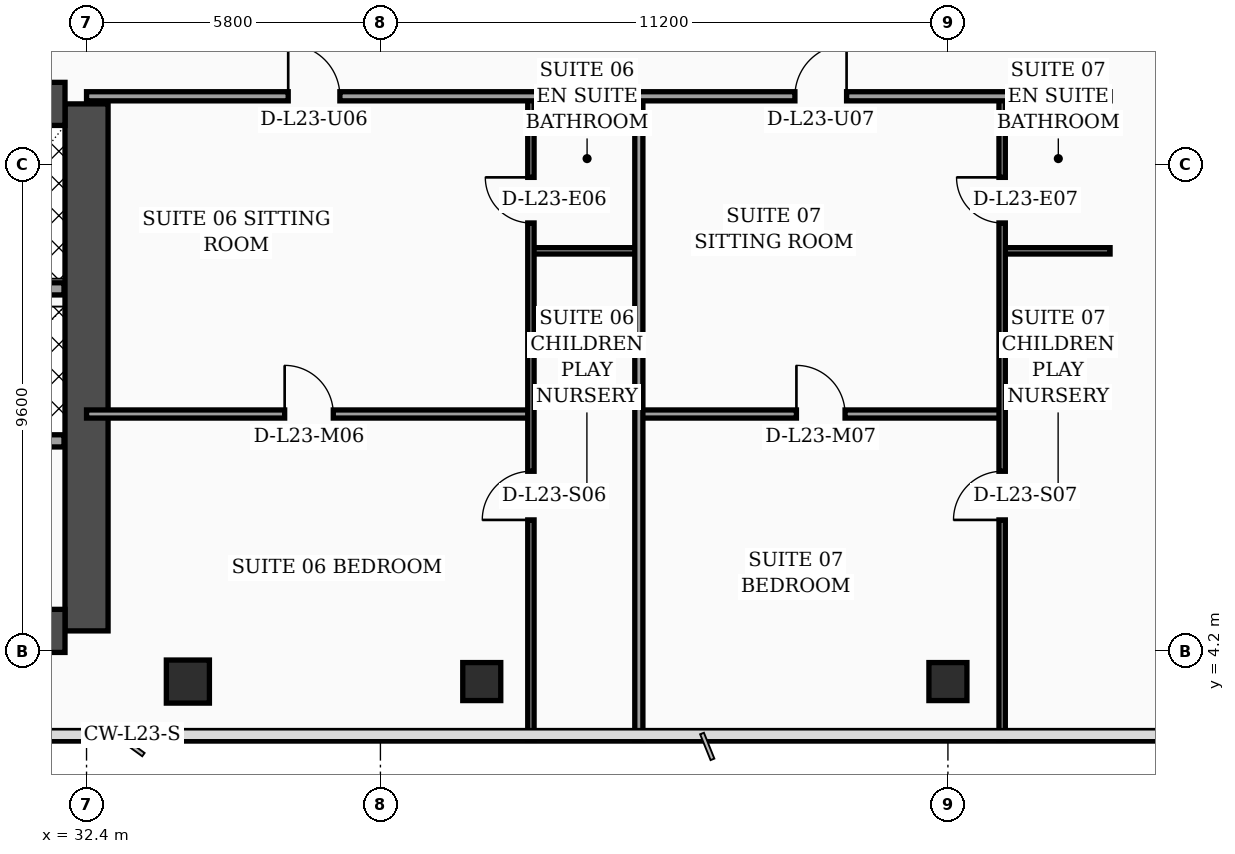
"""IFC4 building model, lengths in metres.
Left out: names, types, materials, properties, quantities, classifications, styles, units other than length and angle.
Written with IfcOpenShell. Run it as: python <this file> out.ifc"""

import sys

from ifc_helpers import new_model, si_unit, direction, frame, frame_2d, origin, origin_2d, place, context, subcontext, project, spatial, rectangle, hollow_rectangle, extrude, element, fill, save


model = new_model("IFC4")
c1 = context("Model", 3, precision=1e-05, world=origin(), true_north=direction((0.0, 1.0)))
c2 = subcontext(c1, "Body", "Model", "MODEL_VIEW")
j1 = project(units=[si_unit("LENGTHUNIT", "METRE"), si_unit("PLANEANGLEUNIT", "RADIAN")], contexts=[c1])
p1 = place(None, origin())
s1 = spatial("IfcSite", under=j1, at=p1, CompositionType="ELEMENT")
p2 = place(p1, origin())
s2 = spatial("IfcBuilding", under=s1, at=p2, CompositionType="ELEMENT")
p3 = place(p2, frame((0.0, 0.0, 97.4)))
s3 = spatial("IfcBuildingStorey", under=s2, at=p3, CompositionType="ELEMENT", Elevation=97.4)
p4 = place(p3, frame((32.4, 4.6, 0.0), z_axis=(0.0, 0.0, 1.0), x_axis=(0.0, 1.0, 0.0)))
e1 = element("IfcWall", 1, at=p4, inside=s3, PredefinedType="SHEAR", context=c2, shape_type="SweptSolid", body=[
    extrude(rectangle(XDim=10.4, YDim=0.85, at=frame_2d((5.2, 0.0))), origin(), (0.0, 0.0, 1.0), 3.56),
])
p5 = place(p3, frame((22.025, 15.0, 0.0), z_axis=(0.0, 0.0, 1.0), x_axis=(1.0, 0.0, 0.0)))
e2 = element("IfcWall", 2, at=p5, inside=s3, PredefinedType="SHEAR", context=c2, shape_type="SweptSolid", body=[
    extrude(rectangle(XDim=9.95, YDim=0.85, at=frame_2d((4.975, 0.0))), origin(), (0.0, 0.0, 1.0), 3.56),
])
p6 = place(p5, frame((4.88, 0.0, 0.0)))
e3 = element("IfcOpeningElement", 3, at=p6, cuts=e2, PredefinedType="OPENING", context=c2, shape_type="SweptSolid", body=[
    extrude(rectangle(XDim=1.1, YDim=2.2, at=frame_2d((0.55, 1.1))), frame((0.0, 0.435, 0.0), z_axis=(0.0, -1.0, 0.0), x_axis=(1.0, 0.0, 0.0)), (0.0, 0.0, 1.0), 0.87),
])
p7 = place(p3, frame((22.025, 4.6, 0.0), z_axis=(0.0, 0.0, 1.0), x_axis=(1.0, 0.0, 0.0)))
e4 = element("IfcWall", 4, at=p7, inside=s3, PredefinedType="SHEAR", context=c2, shape_type="SweptSolid", body=[
    extrude(rectangle(XDim=9.95, YDim=0.85, at=frame_2d((4.975, 0.0))), origin(), (0.0, 0.0, 1.0), 3.56),
])
p8 = place(p3, frame((34.4, 3.6, 0.0), z_axis=(0.0, 0.0, 1.0), x_axis=(1.0, 0.0, 0.0)))
e5 = element("IfcColumn", 5, at=p8, inside=s3, PredefinedType="COLUMN", context=c2, shape_type="SweptSolid", body=[
    extrude(hollow_rectangle(XDim=0.85, YDim=0.85, WallThickness=0.036, at=origin_2d()), origin(), (0.0, 0.0, 1.0), 3.56),
])
for number, where, z_axis, x_axis in (
    (6, (40.2, 3.6, 0.0), (0.0, 0.0, 1.0), (1.0, 0.0, 0.0)),
    (7, (49.4, 3.6, 0.0), (0.0, 0.0, 1.0), (1.0, 0.0, 0.0)),
):
    element("IfcColumn", number, at=place(p3, frame(where, z_axis=z_axis, x_axis=x_axis)), inside=s3, PredefinedType="COLUMN", context=c2, shape_type="SweptSolid", body=[
        extrude(hollow_rectangle(XDim=0.75, YDim=0.75, WallThickness=0.032, at=origin_2d()), origin(), (0.0, 0.0, 1.0), 3.56),
    ])
p9 = place(p3, frame((59.23, 5.505, 0.0), z_axis=(0.0, 0.0, 1.0), x_axis=(-0.300509063924, 0.953778958931, 0.0)))
e8 = element("IfcWall", 8, at=p9, inside=s3, PredefinedType="SOLIDWALL", context=c2, shape_type="SweptSolid", body=[
    extrude(rectangle(XDim=30.814, YDim=0.32, at=frame_2d((15.407, 0.0))), origin(), (0.0, 0.0, 1.0), 3.56),
])
p10 = place(p9, frame((8.9, 0.0, 0.0)))
e9 = element("IfcOpeningElement", 9, at=p10, cuts=e8, PredefinedType="OPENING", context=c2, shape_type="SweptSolid", body=[
    extrude(rectangle(XDim=1.4, YDim=2.25, at=frame_2d((0.7, 1.125))), frame((0.0, 0.17, 0.0), z_axis=(0.0, -1.0, 0.0), x_axis=(1.0, 0.0, 0.0)), (0.0, 0.0, 1.0), 0.34),
])
p11 = place(p9, frame((1.6, 0.0, 0.75)))
e10 = element("IfcOpeningElement", 10, at=p11, cuts=e8, PredefinedType="OPENING", context=c2, shape_type="SweptSolid", body=[
    extrude(rectangle(XDim=1.5, YDim=1.6, at=frame_2d((0.75, 0.8))), frame((0.0, 0.17, 0.0), z_axis=(0.0, -1.0, 0.0), x_axis=(1.0, 0.0, 0.0)), (0.0, 0.0, 1.0), 0.34),
])
p12 = place(p9, frame((4.7, 0.0, 0.75)))
e11 = element("IfcOpeningElement", 11, at=p12, cuts=e8, PredefinedType="OPENING", context=c2, shape_type="SweptSolid", body=[
    extrude(rectangle(XDim=1.5, YDim=1.6, at=frame_2d((0.75, 0.8))), frame((0.0, 0.17, 0.0), z_axis=(0.0, -1.0, 0.0), x_axis=(1.0, 0.0, 0.0)), (0.0, 0.0, 1.0), 0.34),
])
p13 = place(p9, frame((6.75, 0.0, 0.75)))
e12 = element("IfcOpeningElement", 12, at=p13, cuts=e8, PredefinedType="OPENING", context=c2, shape_type="SweptSolid", body=[
    extrude(rectangle(XDim=1.5, YDim=1.6, at=frame_2d((0.75, 0.8))), frame((0.0, 0.17, 0.0), z_axis=(0.0, -1.0, 0.0), x_axis=(1.0, 0.0, 0.0)), (0.0, 0.0, 1.0), 0.34),
])
p14 = place(p9, frame((10.9, 0.0, 0.75)))
e13 = element("IfcOpeningElement", 13, at=p14, cuts=e8, PredefinedType="OPENING", context=c2, shape_type="SweptSolid", body=[
    extrude(rectangle(XDim=1.5, YDim=1.6, at=frame_2d((0.75, 0.8))), frame((0.0, 0.17, 0.0), z_axis=(0.0, -1.0, 0.0), x_axis=(1.0, 0.0, 0.0)), (0.0, 0.0, 1.0), 0.34),
])
p15 = place(p9, frame((14.0, 0.0, 0.75)))
e14 = element("IfcOpeningElement", 14, at=p15, cuts=e8, PredefinedType="OPENING", context=c2, shape_type="SweptSolid", body=[
    extrude(rectangle(XDim=1.5, YDim=1.6, at=frame_2d((0.75, 0.8))), frame((0.0, 0.17, 0.0), z_axis=(0.0, -1.0, 0.0), x_axis=(1.0, 0.0, 0.0)), (0.0, 0.0, 1.0), 0.34),
])
p16 = place(p9, frame((17.1, 0.0, 0.75)))
e15 = element("IfcOpeningElement", 15, at=p16, cuts=e8, PredefinedType="OPENING", context=c2, shape_type="SweptSolid", body=[
    extrude(rectangle(XDim=1.5, YDim=1.6, at=frame_2d((0.75, 0.8))), frame((0.0, 0.17, 0.0), z_axis=(0.0, -1.0, 0.0), x_axis=(1.0, 0.0, 0.0)), (0.0, 0.0, 1.0), 0.34),
])
p17 = place(p9, frame((20.2, 0.0, 0.75)))
e16 = element("IfcOpeningElement", 16, at=p17, cuts=e8, PredefinedType="OPENING", context=c2, shape_type="SweptSolid", body=[
    extrude(rectangle(XDim=1.5, YDim=1.6, at=frame_2d((0.75, 0.8))), frame((0.0, 0.17, 0.0), z_axis=(0.0, -1.0, 0.0), x_axis=(1.0, 0.0, 0.0)), (0.0, 0.0, 1.0), 0.34),
])
p18 = place(p9, frame((23.3, 0.0, 0.75)))
e17 = element("IfcOpeningElement", 17, at=p18, cuts=e8, PredefinedType="OPENING", context=c2, shape_type="SweptSolid", body=[
    extrude(rectangle(XDim=1.5, YDim=1.6, at=frame_2d((0.75, 0.8))), frame((0.0, 0.17, 0.0), z_axis=(0.0, -1.0, 0.0), x_axis=(1.0, 0.0, 0.0)), (0.0, 0.0, 1.0), 0.34),
])
p19 = place(p9, frame((26.4, 0.0, 0.75)))
e18 = element("IfcOpeningElement", 18, at=p19, cuts=e8, PredefinedType="OPENING", context=c2, shape_type="SweptSolid", body=[
    extrude(rectangle(XDim=1.5, YDim=1.6, at=frame_2d((0.75, 0.8))), frame((0.0, 0.17, 0.0), z_axis=(0.0, -1.0, 0.0), x_axis=(1.0, 0.0, 0.0)), (0.0, 0.0, 1.0), 0.34),
])
p20 = place(p3, frame((27.02, 11.35, 0.0), z_axis=(0.0, 0.0, 1.0), x_axis=(1.0, 0.0, 0.0)))
e19 = element("IfcWall", 19, at=p20, inside=s3, PredefinedType="SOLIDWALL", context=c2, shape_type="SweptSolid", body=[
    extrude(rectangle(XDim=4.935, YDim=0.24, at=frame_2d((2.468, 0.0))), origin(), (0.0, 0.0, 1.0), 3.56),
])
p21 = place(p20, frame((0.45, 0.0, 0.0)))
e20 = element("IfcOpeningElement", 20, at=p21, cuts=e19, PredefinedType="OPENING", context=c2, shape_type="SweptSolid", body=[
    extrude(rectangle(XDim=1.3, YDim=2.35, at=frame_2d((0.65, 1.175))), frame((0.0, 0.13, 0.0), z_axis=(0.0, -1.0, 0.0), x_axis=(1.0, 0.0, 0.0)), (0.0, 0.0, 1.0), 0.26),
])
p22 = place(p3, frame((27.02, 8.35, 0.0), z_axis=(0.0, 0.0, 1.0), x_axis=(1.0, 0.0, 0.0)))
e21 = element("IfcWall", 21, at=p22, inside=s3, PredefinedType="SOLIDWALL", context=c2, shape_type="SweptSolid", body=[
    extrude(rectangle(XDim=4.935, YDim=0.24, at=frame_2d((2.468, 0.0))), origin(), (0.0, 0.0, 1.0), 3.09),
])
p23 = place(p3, frame((41.17, 12.1, 0.0), z_axis=(0.0, 0.0, 1.0), x_axis=(1.0, 0.0, 0.0)))
e22 = element("IfcWall", 22, at=p23, inside=s3, PredefinedType="PARTITIONING", context=c2, shape_type="SweptSolid", body=[
    extrude(rectangle(XDim=2.13, YDim=0.125, at=frame_2d((1.065, 0.0))), origin(), (0.0, 0.0, 1.0), 3.56),
])
p24 = place(p3, frame((32.4, 8.88, 0.0), z_axis=(0.0, 0.0, 1.0), x_axis=(1.0, 0.0, 0.0)))
e23 = element("IfcWall", 23, at=p24, inside=s3, PredefinedType="PARTITIONING", context=c2, shape_type="SweptSolid", body=[
    extrude(rectangle(XDim=8.77, YDim=0.16, at=frame_2d((4.385, 0.0))), origin(), (0.0, 0.0, 1.0), 2.84),
])
p25 = place(p24, frame((3.91, 0.0, 0.0)))
e24 = element("IfcOpeningElement", 24, at=p25, cuts=e23, PredefinedType="OPENING", context=c2, shape_type="SweptSolid", body=[
    extrude(rectangle(XDim=0.96, YDim=2.2, at=frame_2d((0.48, 1.1))), frame((0.0, 0.09, 0.0), z_axis=(0.0, -1.0, 0.0), x_axis=(1.0, 0.0, 0.0)), (0.0, 0.0, 1.0), 0.18),
])
p26 = place(p3, frame((41.17, 2.44, 0.0), z_axis=(0.0, 0.0, 1.0), x_axis=(0.0, 1.0, 0.0)))
e25 = element("IfcWall", 25, at=p26, inside=s3, PredefinedType="PARTITIONING", context=c2, shape_type="SweptSolid", body=[
    extrude(rectangle(XDim=12.71, YDim=0.125, at=frame_2d((6.355, 0.0))), origin(), (0.0, 0.0, 1.0), 3.04),
])
p27 = place(p26, frame((4.35, 0.0, 0.0)))
e26 = element("IfcOpeningElement", 26, at=p27, cuts=e25, PredefinedType="OPENING", context=c2, shape_type="SweptSolid", body=[
    extrude(rectangle(XDim=0.96, YDim=2.2, at=frame_2d((0.48, 1.1))), frame((0.0, 0.073, 0.0), z_axis=(0.0, -1.0, 0.0), x_axis=(1.0, 0.0, 0.0)), (0.0, 0.0, 1.0), 0.145),
])
p28 = place(p26, frame((10.21, 0.0, 0.0)))
e27 = element("IfcOpeningElement", 27, at=p28, cuts=e25, PredefinedType="OPENING", context=c2, shape_type="SweptSolid", body=[
    extrude(rectangle(XDim=0.9, YDim=2.15, at=frame_2d((0.45, 1.075))), frame((0.0, 0.073, 0.0), z_axis=(0.0, -1.0, 0.0), x_axis=(1.0, 0.0, 0.0)), (0.0, 0.0, 1.0), 0.145),
])
p29 = place(p3, frame((50.47, 12.1, 0.0), z_axis=(0.0, 0.0, 1.0), x_axis=(1.0, 0.0, 0.0)))
e28 = element("IfcWall", 28, at=p29, inside=s3, PredefinedType="PARTITIONING", context=c2, shape_type="SweptSolid", body=[
    extrude(rectangle(XDim=2.13, YDim=0.125, at=frame_2d((1.065, 0.0))), origin(), (0.0, 0.0, 1.0), 3.56),
])
p30 = place(p3, frame((43.3, 8.88, 0.0), z_axis=(0.0, 0.0, 1.0), x_axis=(1.0, 0.0, 0.0)))
e29 = element("IfcWall", 29, at=p30, inside=s3, PredefinedType="PARTITIONING", context=c2, shape_type="SweptSolid", body=[
    extrude(rectangle(XDim=7.17, YDim=0.16, at=frame_2d((3.585, 0.0))), origin(), (0.0, 0.0, 1.0), 2.84),
])
p31 = place(p30, frame((3.11, 0.0, 0.0)))
e30 = element("IfcOpeningElement", 30, at=p31, cuts=e29, PredefinedType="OPENING", context=c2, shape_type="SweptSolid", body=[
    extrude(rectangle(XDim=0.96, YDim=2.2, at=frame_2d((0.48, 1.1))), frame((0.0, 0.09, 0.0), z_axis=(0.0, -1.0, 0.0), x_axis=(1.0, 0.0, 0.0)), (0.0, 0.0, 1.0), 0.18),
])
p32 = place(p3, frame((50.47, 2.44, 0.0), z_axis=(0.0, 0.0, 1.0), x_axis=(0.0, 1.0, 0.0)))
e31 = element("IfcWall", 31, at=p32, inside=s3, PredefinedType="PARTITIONING", context=c2, shape_type="SweptSolid", body=[
    extrude(rectangle(XDim=12.71, YDim=0.125, at=frame_2d((6.355, 0.0))), origin(), (0.0, 0.0, 1.0), 3.04),
])
p33 = place(p32, frame((4.35, 0.0, 0.0)))
e32 = element("IfcOpeningElement", 32, at=p33, cuts=e31, PredefinedType="OPENING", context=c2, shape_type="SweptSolid", body=[
    extrude(rectangle(XDim=0.96, YDim=2.2, at=frame_2d((0.48, 1.1))), frame((0.0, 0.073, 0.0), z_axis=(0.0, -1.0, 0.0), x_axis=(1.0, 0.0, 0.0)), (0.0, 0.0, 1.0), 0.145),
])
p34 = place(p32, frame((10.21, 0.0, 0.0)))
e33 = element("IfcOpeningElement", 33, at=p34, cuts=e31, PredefinedType="OPENING", context=c2, shape_type="SweptSolid", body=[
    extrude(rectangle(XDim=0.9, YDim=2.15, at=frame_2d((0.45, 1.075))), frame((0.0, 0.073, 0.0), z_axis=(0.0, -1.0, 0.0), x_axis=(1.0, 0.0, 0.0)), (0.0, 0.0, 1.0), 0.145),
])
p35 = place(p3, frame((43.3, 2.44, 0.0), z_axis=(0.0, 0.0, 1.0), x_axis=(0.0, 1.0, 0.0)))
e34 = element("IfcWall", 34, at=p35, inside=s3, PredefinedType="PARTITIONING", context=c2, shape_type="SweptSolid", body=[
    extrude(rectangle(XDim=12.71, YDim=0.16, at=frame_2d((6.355, 0.0))), origin(), (0.0, 0.0, 1.0), 3.04),
])
p36 = place(p3, frame((32.4, 15.15, 0.0), z_axis=(0.0, 0.0, 1.0), x_axis=(1.0, 0.0, 0.0)))
e35 = element("IfcWall", 35, at=p36, inside=s3, PredefinedType="PARTITIONING", context=c2, shape_type="SweptSolid", body=[
    extrude(rectangle(XDim=20.2, YDim=0.18, at=frame_2d((10.1, 0.0))), origin(), (0.0, 0.0, 1.0), 2.84),
])
p37 = place(p36, frame((3.98, 0.0, 0.0)))
e36 = element("IfcOpeningElement", 36, at=p37, cuts=e35, PredefinedType="OPENING", context=c2, shape_type="SweptSolid", body=[
    extrude(rectangle(XDim=1.02, YDim=2.2, at=frame_2d((0.51, 1.1))), frame((0.0, 0.1, 0.0), z_axis=(0.0, -1.0, 0.0), x_axis=(1.0, 0.0, 0.0)), (0.0, 0.0, 1.0), 0.2),
])
p38 = place(p36, frame((13.98, 0.0, 0.0)))
e37 = element("IfcOpeningElement", 37, at=p38, cuts=e35, PredefinedType="OPENING", context=c2, shape_type="SweptSolid", body=[
    extrude(rectangle(XDim=1.02, YDim=2.2, at=frame_2d((0.51, 1.1))), frame((0.0, 0.1, 0.0), z_axis=(0.0, -1.0, 0.0), x_axis=(1.0, 0.0, 0.0)), (0.0, 0.0, 1.0), 0.2),
])
p39 = place(p25, origin())
e38 = element("IfcDoor", 38, at=p39, inside=s3, OperationType="SINGLE_SWING_LEFT", PredefinedType="DOOR", context=c2, shape_type="SweptSolid", body=[
    extrude(rectangle(XDim=0.96, YDim=2.2, at=frame_2d((0.48, 1.1))), frame((0.0, 0.025, 0.0), z_axis=(0.0, -1.0, 0.0), x_axis=(1.0, 0.0, 0.0)), (0.0, 0.0, 1.0), 0.05),
])
fill(e24, e38)
p40 = place(p27, origin())
e39 = element("IfcDoor", 39, at=p40, inside=s3, OperationType="SINGLE_SWING_LEFT", PredefinedType="DOOR", context=c2, shape_type="SweptSolid", body=[
    extrude(rectangle(XDim=0.96, YDim=2.2, at=frame_2d((0.48, 1.1))), frame((0.0, 0.025, 0.0), z_axis=(0.0, -1.0, 0.0), x_axis=(1.0, 0.0, 0.0)), (0.0, 0.0, 1.0), 0.05),
])
fill(e26, e39)
p41 = place(p28, origin())
e40 = element("IfcDoor", 40, at=p41, inside=s3, OperationType="SINGLE_SWING_RIGHT", PredefinedType="DOOR", context=c2, shape_type="SweptSolid", body=[
    extrude(rectangle(XDim=0.9, YDim=2.15, at=frame_2d((0.45, 1.075))), frame((0.0, 0.025, 0.0), z_axis=(0.0, -1.0, 0.0), x_axis=(1.0, 0.0, 0.0)), (0.0, 0.0, 1.0), 0.05),
])
fill(e27, e40)
p42 = place(p31, origin())
e41 = element("IfcDoor", 41, at=p42, inside=s3, OperationType="SINGLE_SWING_LEFT", PredefinedType="DOOR", context=c2, shape_type="SweptSolid", body=[
    extrude(rectangle(XDim=0.96, YDim=2.2, at=frame_2d((0.48, 1.1))), frame((0.0, 0.025, 0.0), z_axis=(0.0, -1.0, 0.0), x_axis=(1.0, 0.0, 0.0)), (0.0, 0.0, 1.0), 0.05),
])
fill(e30, e41)
p43 = place(p33, origin())
e42 = element("IfcDoor", 42, at=p43, inside=s3, OperationType="SINGLE_SWING_LEFT", PredefinedType="DOOR", context=c2, shape_type="SweptSolid", body=[
    extrude(rectangle(XDim=0.96, YDim=2.2, at=frame_2d((0.48, 1.1))), frame((0.0, 0.025, 0.0), z_axis=(0.0, -1.0, 0.0), x_axis=(1.0, 0.0, 0.0)), (0.0, 0.0, 1.0), 0.05),
])
fill(e32, e42)
p44 = place(p34, origin())
e43 = element("IfcDoor", 43, at=p44, inside=s3, OperationType="SINGLE_SWING_RIGHT", PredefinedType="DOOR", context=c2, shape_type="SweptSolid", body=[
    extrude(rectangle(XDim=0.9, YDim=2.15, at=frame_2d((0.45, 1.075))), frame((0.0, 0.025, 0.0), z_axis=(0.0, -1.0, 0.0), x_axis=(1.0, 0.0, 0.0)), (0.0, 0.0, 1.0), 0.05),
])
fill(e33, e43)
p45 = place(p37, origin())
e44 = element("IfcDoor", 44, at=p45, inside=s3, OperationType="SINGLE_SWING_LEFT", PredefinedType="DOOR", context=c2, shape_type="SweptSolid", body=[
    extrude(rectangle(XDim=1.02, YDim=2.2, at=frame_2d((0.51, 1.1))), frame((0.0, 0.025, 0.0), z_axis=(0.0, -1.0, 0.0), x_axis=(1.0, 0.0, 0.0)), (0.0, 0.0, 1.0), 0.05),
])
fill(e36, e44)
p46 = place(p38, origin())
e45 = element("IfcDoor", 45, at=p46, inside=s3, OperationType="SINGLE_SWING_RIGHT", PredefinedType="DOOR", context=c2, shape_type="SweptSolid", body=[
    extrude(rectangle(XDim=1.02, YDim=2.2, at=frame_2d((0.51, 1.1))), frame((0.0, 0.025, 0.0), z_axis=(0.0, -1.0, 0.0), x_axis=(1.0, 0.0, 0.0)), (0.0, 0.0, 1.0), 0.05),
])
fill(e37, e45)
save(model, sys.argv[1])
